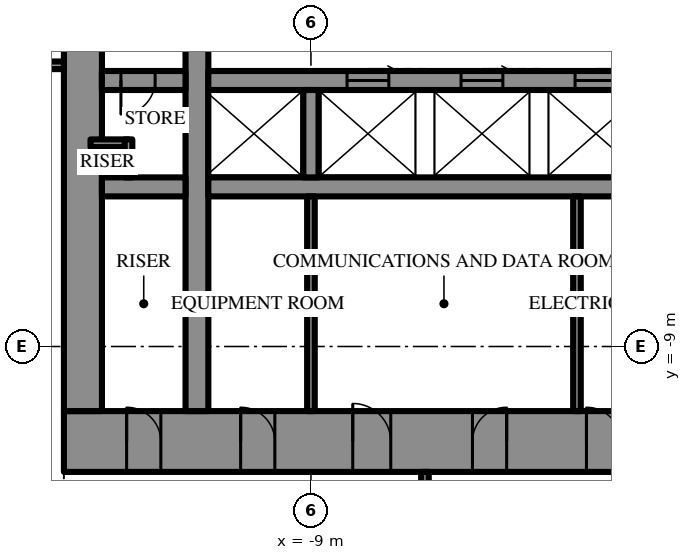
"""IFC4 building model, lengths in metres.
Left out: names, types, materials, properties, quantities, classifications, styles, units other than length and angle.
Written with IfcOpenShell. Run it as: python <this file> out.ifc"""

import sys

from ifc_helpers import new_model, si_unit, direction, frame, frame_2d, origin, place, context, subcontext, project, spatial, rectangle, extrude, element, fill, save


model = new_model("IFC4")
c1 = context("Model", 3, precision=1e-05, world=origin(), true_north=direction((0.0, 1.0)))
c2 = subcontext(c1, "Body", "Model", "MODEL_VIEW")
j1 = project(units=[si_unit("LENGTHUNIT", "METRE"), si_unit("PLANEANGLEUNIT", "RADIAN")], contexts=[c1])
p1 = place(None, origin())
s1 = spatial("IfcSite", under=j1, at=p1, CompositionType="ELEMENT")
p2 = place(p1, origin())
s2 = spatial("IfcBuilding", under=s1, at=p2, CompositionType="ELEMENT")
p3 = place(p2, frame((0.0, 0.0, 295.3)))
s3 = spatial("IfcBuildingStorey", under=s2, at=p3, CompositionType="ELEMENT", Elevation=295.3)
p4 = place(p3, frame((15.5, -11.5, 0.0), z_axis=(0.0, 0.0, 1.0), x_axis=(-1.0, 0.0, 0.0)))
e1 = element("IfcWall", 1, at=p4, inside=s3, PredefinedType="SHEAR", context=c2, shape_type="SweptSolid", body=[
    extrude(rectangle(XDim=31.0, YDim=1.6, at=frame_2d((15.5, 0.0))), origin(), (0.0, 0.0, 1.0), 4.2),
])
p5 = place(p4, frame((16.35, 0.0, 0.0)))
e2 = element("IfcOpeningElement", 2, at=p5, cuts=e1, PredefinedType="OPENING", context=c2, shape_type="SweptSolid", body=[
    extrude(rectangle(XDim=0.9, YDim=2.2, at=frame_2d((0.45, 1.1))), frame((0.0, 0.81, 0.0), z_axis=(0.0, -1.0, 0.0), x_axis=(1.0, 0.0, 0.0)), (0.0, 0.0, 1.0), 1.62),
])
p6 = place(p4, frame((19.35, 0.0, 0.0)))
e3 = element("IfcOpeningElement", 3, at=p6, cuts=e1, PredefinedType="OPENING", context=c2, shape_type="SweptSolid", body=[
    extrude(rectangle(XDim=0.9, YDim=2.2, at=frame_2d((0.45, 1.1))), frame((0.0, 0.81, 0.0), z_axis=(0.0, -1.0, 0.0), x_axis=(1.0, 0.0, 0.0)), (0.0, 0.0, 1.0), 1.62),
])
p7 = place(p4, frame((22.4, 0.0, 0.0)))
e4 = element("IfcOpeningElement", 4, at=p7, cuts=e1, PredefinedType="OPENING", context=c2, shape_type="SweptSolid", body=[
    extrude(rectangle(XDim=1.0, YDim=2.2, at=frame_2d((0.5, 1.1))), frame((0.0, 0.81, 0.0), z_axis=(0.0, -1.0, 0.0), x_axis=(1.0, 0.0, 0.0)), (0.0, 0.0, 1.0), 1.62),
])
p8 = place(p4, frame((1.65, 0.0, 0.0)))
e5 = element("IfcOpeningElement", 5, at=p8, cuts=e1, PredefinedType="OPENING", context=c2, shape_type="SweptSolid", body=[
    extrude(rectangle(XDim=0.9, YDim=2.2, at=frame_2d((0.45, 1.1))), frame((0.0, 0.81, 0.0), z_axis=(0.0, -1.0, 0.0), x_axis=(1.0, 0.0, 0.0)), (0.0, 0.0, 1.0), 1.62),
])
p9 = place(p4, frame((4.65, 0.0, 0.0)))
e6 = element("IfcOpeningElement", 6, at=p9, cuts=e1, PredefinedType="OPENING", context=c2, shape_type="SweptSolid", body=[
    extrude(rectangle(XDim=0.9, YDim=2.2, at=frame_2d((0.45, 1.1))), frame((0.0, 0.81, 0.0), z_axis=(0.0, -1.0, 0.0), x_axis=(1.0, 0.0, 0.0)), (0.0, 0.0, 1.0), 1.62),
])
p10 = place(p4, frame((25.45, 0.0, 0.0)))
e7 = element("IfcOpeningElement", 7, at=p10, cuts=e1, PredefinedType="OPENING", context=c2, shape_type="SweptSolid", body=[
    extrude(rectangle(XDim=0.9, YDim=2.2, at=frame_2d((0.45, 1.1))), frame((0.0, 0.81, 0.0), z_axis=(0.0, -1.0, 0.0), x_axis=(1.0, 0.0, 0.0)), (0.0, 0.0, 1.0), 1.62),
])
p11 = place(p4, frame((28.45, 0.0, 0.0)))
e8 = element("IfcOpeningElement", 8, at=p11, cuts=e1, PredefinedType="OPENING", context=c2, shape_type="SweptSolid", body=[
    extrude(rectangle(XDim=0.9, YDim=2.2, at=frame_2d((0.45, 1.1))), frame((0.0, 0.81, 0.0), z_axis=(0.0, -1.0, 0.0), x_axis=(1.0, 0.0, 0.0)), (0.0, 0.0, 1.0), 1.62),
])
p12 = place(p3, frame((-15.0, 10.7, 0.0), z_axis=(0.0, 0.0, 1.0), x_axis=(0.0, -1.0, 0.0)))
e9 = element("IfcWall", 9, at=p12, inside=s3, PredefinedType="SHEAR", context=c2, shape_type="SweptSolid", body=[
    extrude(rectangle(XDim=21.4, YDim=1.0, at=frame_2d((10.7, 0.0))), origin(), (0.0, 0.0, 1.0), 4.2),
])
p13 = place(p12, frame((9.8, 0.0, 0.0)))
e10 = element("IfcOpeningElement", 10, at=p13, cuts=e9, PredefinedType="OPENING", context=c2, shape_type="SweptSolid", body=[
    extrude(rectangle(XDim=1.8, YDim=2.4, at=frame_2d((0.9, 1.2))), frame((0.0, 0.51, 0.0), z_axis=(0.0, -1.0, 0.0), x_axis=(1.0, 0.0, 0.0)), (0.0, 0.0, 1.0), 1.02),
])
p14 = place(p3, frame((-12.0, -10.7, 0.0), z_axis=(0.0, 0.0, 1.0), x_axis=(0.0, 1.0, 0.0)))
e11 = element("IfcWall", 11, at=p14, inside=s3, PredefinedType="SHEAR", context=c2, shape_type="SweptSolid", body=[
    extrude(rectangle(XDim=21.4, YDim=0.6, at=frame_2d((10.7, 0.0))), origin(), (0.0, 0.0, 1.0), 4.2),
])
p15 = place(p14, frame((9.8, 0.0, 0.0)))
e12 = element("IfcOpeningElement", 12, at=p15, cuts=e11, PredefinedType="OPENING", context=c2, shape_type="SweptSolid", body=[
    extrude(rectangle(XDim=1.8, YDim=2.4, at=frame_2d((0.9, 1.2))), frame((0.0, 0.31, 0.0), z_axis=(0.0, -1.0, 0.0), x_axis=(1.0, 0.0, 0.0)), (0.0, 0.0, 1.0), 0.62),
])
p16 = place(p3, frame((3.2, -2.0, 0.0), z_axis=(0.0, 0.0, 1.0), x_axis=(-1.0, 0.0, 0.0)))
e13 = element("IfcWall", 13, at=p16, inside=s3, PredefinedType="SHEAR", context=c2, shape_type="SweptSolid", body=[
    extrude(rectangle(XDim=14.9, YDim=0.5, at=frame_2d((7.45, 0.0))), origin(), (0.0, 0.0, 1.0), 4.2),
])
p17 = place(p16, frame((1.15, 0.0, 0.0)))
e14 = element("IfcOpeningElement", 14, at=p17, cuts=e13, PredefinedType="OPENING", context=c2, shape_type="SweptSolid", body=[
    extrude(rectangle(XDim=1.1, YDim=2.2, at=frame_2d((0.55, 1.1))), frame((0.0, 0.26, 0.0), z_axis=(0.0, -1.0, 0.0), x_axis=(1.0, 0.0, 0.0)), (0.0, 0.0, 1.0), 0.52),
])
p18 = place(p16, frame((4.15, 0.0, 0.0)))
e15 = element("IfcOpeningElement", 15, at=p18, cuts=e13, PredefinedType="OPENING", context=c2, shape_type="SweptSolid", body=[
    extrude(rectangle(XDim=1.1, YDim=2.2, at=frame_2d((0.55, 1.1))), frame((0.0, 0.26, 0.0), z_axis=(0.0, -1.0, 0.0), x_axis=(1.0, 0.0, 0.0)), (0.0, 0.0, 1.0), 0.52),
])
p19 = place(p16, frame((7.15, 0.0, 0.0)))
e16 = element("IfcOpeningElement", 16, at=p19, cuts=e13, PredefinedType="OPENING", context=c2, shape_type="SweptSolid", body=[
    extrude(rectangle(XDim=1.1, YDim=2.2, at=frame_2d((0.55, 1.1))), frame((0.0, 0.26, 0.0), z_axis=(0.0, -1.0, 0.0), x_axis=(1.0, 0.0, 0.0)), (0.0, 0.0, 1.0), 0.52),
])
p20 = place(p16, frame((10.15, 0.0, 0.0)))
e17 = element("IfcOpeningElement", 17, at=p20, cuts=e13, PredefinedType="OPENING", context=c2, shape_type="SweptSolid", body=[
    extrude(rectangle(XDim=1.1, YDim=2.2, at=frame_2d((0.55, 1.1))), frame((0.0, 0.26, 0.0), z_axis=(0.0, -1.0, 0.0), x_axis=(1.0, 0.0, 0.0)), (0.0, 0.0, 1.0), 0.52),
])
p21 = place(p3, frame((-12.3, -2.0, 0.0), z_axis=(0.0, 0.0, 1.0), x_axis=(-1.0, 0.0, 0.0)))
e18 = element("IfcWall", 18, at=p21, inside=s3, PredefinedType="SHEAR", context=c2, shape_type="SweptSolid", body=[
    extrude(rectangle(XDim=2.2, YDim=0.5, at=frame_2d((1.1, 0.0))), origin(), (0.0, 0.0, 1.0), 4.2),
])
p22 = place(p21, frame((0.8, 0.0, 0.0)))
e19 = element("IfcOpeningElement", 19, at=p22, cuts=e18, PredefinedType="OPENING", context=c2, shape_type="SweptSolid", body=[
    extrude(rectangle(XDim=0.9, YDim=2.2, at=frame_2d((0.45, 1.1))), frame((0.0, 0.26, 0.0), z_axis=(0.0, -1.0, 0.0), x_axis=(1.0, 0.0, 0.0)), (0.0, 0.0, 1.0), 0.52),
])
p23 = place(p3, frame((11.7, -4.8, 0.0), z_axis=(0.0, 0.0, 1.0), x_axis=(-1.0, 0.0, 0.0)))
e20 = element("IfcWall", 20, at=p23, inside=s3, PredefinedType="SHEAR", context=c2, shape_type="SweptSolid", body=[
    extrude(rectangle(XDim=23.4, YDim=0.5, at=frame_2d((11.7, 0.0))), origin(), (0.0, 0.0, 1.0), 4.2),
])
p24 = place(p23, frame((6.6, 0.0, 0.0)))
e21 = element("IfcOpeningElement", 21, at=p24, cuts=e20, PredefinedType="OPENING", context=c2, shape_type="SweptSolid", body=[
    extrude(rectangle(XDim=1.2, YDim=2.2, at=frame_2d((0.6, 1.1))), frame((0.0, 0.26, 0.0), z_axis=(0.0, -1.0, 0.0), x_axis=(1.0, 0.0, 0.0)), (0.0, 0.0, 1.0), 0.52),
])
p25 = place(p23, frame((3.6, 0.0, 0.0)))
e22 = element("IfcOpeningElement", 22, at=p25, cuts=e20, PredefinedType="OPENING", context=c2, shape_type="SweptSolid", body=[
    extrude(rectangle(XDim=1.2, YDim=2.2, at=frame_2d((0.6, 1.1))), frame((0.0, 0.26, 0.0), z_axis=(0.0, -1.0, 0.0), x_axis=(1.0, 0.0, 0.0)), (0.0, 0.0, 1.0), 0.52),
])
p26 = place(p3, frame((-12.3, -4.8, 0.0), z_axis=(0.0, 0.0, 1.0), x_axis=(-1.0, 0.0, 0.0)))
e23 = element("IfcWall", 23, at=p26, inside=s3, PredefinedType="SHEAR", context=c2, shape_type="SweptSolid", body=[
    extrude(rectangle(XDim=2.2, YDim=0.5, at=frame_2d((1.1, 0.0))), origin(), (0.0, 0.0, 1.0), 4.2),
])
p27 = place(p3, frame((-9.0, -2.25, 0.0), z_axis=(0.0, 0.0, 1.0), x_axis=(0.0, -1.0, 0.0)))
e24 = element("IfcWall", 24, at=p27, inside=s3, PredefinedType="SHEAR", context=c2, shape_type="SweptSolid", body=[
    extrude(rectangle(XDim=2.3, YDim=0.4, at=frame_2d((1.15, 0.0))), origin(), (0.0, 0.0, 1.0), 4.2),
])
for number, where, z_axis, x_axis in (
    (25, (-9.0, -5.05, 0.0), (0.0, 0.0, 1.0), (0.0, -1.0, 0.0)),
    (26, (-2.0, -5.05, 0.0), (0.0, 0.0, 1.0), (0.0, -1.0, 0.0)),
):
    element("IfcWall", number, at=place(p3, frame(where, z_axis=z_axis, x_axis=x_axis)), inside=s3, PredefinedType="PARTITIONING", context=c2, shape_type="SweptSolid", body=[
        extrude(rectangle(XDim=5.65, YDim=0.2, at=frame_2d((2.825, 0.0))), origin(), (0.0, 0.0, 1.0), 3.9),
    ])
for number, where, z_axis, x_axis in (
    (27, (-13.8, -3.65, 0.0), (0.0, 0.0, 1.0), (-1.0, 0.0, 0.0)),
    (28, (-13.8, -3.55, 0.0), (0.0, 0.0, 1.0), (0.0, -1.0, 0.0)),
):
    element("IfcWall", number, at=place(p3, frame(where, z_axis=z_axis, x_axis=x_axis)), inside=s3, PredefinedType="PARTITIONING", context=c2, shape_type="SweptSolid", body=[
        extrude(rectangle(XDim=1.0, YDim=0.2, at=frame_2d((0.5, 0.0))), origin(), (0.0, 0.0, 1.0), 3.9),
    ])
p28 = place(p3, frame((-15.5, -1.6, 0.0), z_axis=(0.0, 0.0, 1.0), x_axis=(-1.0, 0.0, 0.0)))
e29 = element("IfcWall", 29, at=p28, inside=s3, PredefinedType="PARTITIONING", context=c2, shape_type="SweptSolid", body=[
    extrude(rectangle(XDim=10.7, YDim=0.2, at=frame_2d((5.35, 0.0))), origin(), (0.0, 0.0, 1.0), 3.9),
])
p29 = place(p28, frame((2.71, 0.0, 0.0)))
e30 = element("IfcOpeningElement", 30, at=p29, cuts=e29, PredefinedType="OPENING", context=c2, shape_type="SweptSolid", body=[
    extrude(rectangle(XDim=1.0, YDim=2.2, at=frame_2d((0.5, 1.1))), frame((0.0, 0.11, 0.0), z_axis=(0.0, -1.0, 0.0), x_axis=(1.0, 0.0, 0.0)), (0.0, 0.0, 1.0), 0.22),
])
p30 = place(p3, frame((-6.0, -12.3, 0.0), z_axis=(0.0, 0.0, 1.0), x_axis=(0.0, -1.0, 0.0)))
e31 = element("IfcWall", 31, at=p30, inside=s3, PredefinedType="PARTITIONING", context=c2, shape_type="SweptSolid", body=[
    extrude(rectangle(XDim=16.5, YDim=0.2, at=frame_2d((8.25, 0.0))), origin(), (0.0, 0.0, 1.0), 3.9),
])
p31 = place(p5, frame((0.9, 0.0, 0.0), z_axis=(0.0, 0.0, 1.0), x_axis=(-1.0, 0.0, 0.0)))
e32 = element("IfcDoor", 32, at=p31, inside=s3, OperationType="SINGLE_SWING_RIGHT", PredefinedType="DOOR", context=c2, shape_type="SweptSolid", body=[
    extrude(rectangle(XDim=0.9, YDim=2.2, at=frame_2d((0.45, 1.1))), frame((0.0, 0.025, 0.0), z_axis=(0.0, -1.0, 0.0), x_axis=(1.0, 0.0, 0.0)), (0.0, 0.0, 1.0), 0.05),
])
fill(e2, e32)
p32 = place(p6, frame((0.9, 0.0, 0.0), z_axis=(0.0, 0.0, 1.0), x_axis=(-1.0, 0.0, 0.0)))
e33 = element("IfcDoor", 33, at=p32, inside=s3, OperationType="SINGLE_SWING_LEFT", PredefinedType="DOOR", context=c2, shape_type="SweptSolid", body=[
    extrude(rectangle(XDim=0.9, YDim=2.2, at=frame_2d((0.45, 1.1))), frame((0.0, 0.025, 0.0), z_axis=(0.0, -1.0, 0.0), x_axis=(1.0, 0.0, 0.0)), (0.0, 0.0, 1.0), 0.05),
])
fill(e3, e33)
p33 = place(p7, frame((1.0, 0.0, 0.0), z_axis=(0.0, 0.0, 1.0), x_axis=(-1.0, 0.0, 0.0)))
e34 = element("IfcDoor", 34, at=p33, inside=s3, OperationType="SINGLE_SWING_RIGHT", PredefinedType="DOOR", context=c2, shape_type="SweptSolid", body=[
    extrude(rectangle(XDim=1.0, YDim=2.2, at=frame_2d((0.5, 1.1))), frame((0.0, 0.025, 0.0), z_axis=(0.0, -1.0, 0.0), x_axis=(1.0, 0.0, 0.0)), (0.0, 0.0, 1.0), 0.05),
])
fill(e4, e34)
p34 = place(p10, frame((0.9, 0.0, 0.0), z_axis=(0.0, 0.0, 1.0), x_axis=(-1.0, 0.0, 0.0)))
e35 = element("IfcDoor", 35, at=p34, inside=s3, OperationType="SINGLE_SWING_RIGHT", PredefinedType="DOOR", context=c2, shape_type="SweptSolid", body=[
    extrude(rectangle(XDim=0.9, YDim=2.2, at=frame_2d((0.45, 1.1))), frame((0.0, 0.025, 0.0), z_axis=(0.0, -1.0, 0.0), x_axis=(1.0, 0.0, 0.0)), (0.0, 0.0, 1.0), 0.05),
])
fill(e7, e35)
p35 = place(p11, frame((0.9, 0.0, 0.0), z_axis=(0.0, 0.0, 1.0), x_axis=(-1.0, 0.0, 0.0)))
e36 = element("IfcDoor", 36, at=p35, inside=s3, OperationType="SINGLE_SWING_RIGHT", PredefinedType="DOOR", context=c2, shape_type="SweptSolid", body=[
    extrude(rectangle(XDim=0.9, YDim=2.2, at=frame_2d((0.45, 1.1))), frame((0.0, 0.025, 0.0), z_axis=(0.0, -1.0, 0.0), x_axis=(1.0, 0.0, 0.0)), (0.0, 0.0, 1.0), 0.05),
])
fill(e8, e36)
p36 = place(p22, origin())
e37 = element("IfcDoor", 37, at=p36, inside=s3, OperationType="SINGLE_SWING_LEFT", PredefinedType="DOOR", context=c2, shape_type="SweptSolid", body=[
    extrude(rectangle(XDim=0.9, YDim=2.2, at=frame_2d((0.45, 1.1))), frame((0.0, 0.025, 0.0), z_axis=(0.0, -1.0, 0.0), x_axis=(1.0, 0.0, 0.0)), (0.0, 0.0, 1.0), 0.05),
])
fill(e19, e37)
p37 = place(p18, frame((1.1, 0.0, 0.0), z_axis=(0.0, 0.0, 1.0), x_axis=(-1.0, 0.0, 0.0)))
e38 = element("IfcDoor", 38, at=p37, inside=s3, OperationType="SLIDING_TO_LEFT", PredefinedType="DOOR", context=c2, shape_type="SweptSolid", body=[
    extrude(rectangle(XDim=1.1, YDim=2.2, at=frame_2d((0.55, 1.1))), frame((0.0, 0.025, 0.0), z_axis=(0.0, -1.0, 0.0), x_axis=(1.0, 0.0, 0.0)), (0.0, 0.0, 1.0), 0.05),
])
fill(e15, e38)
p38 = place(p19, frame((1.1, 0.0, 0.0), z_axis=(0.0, 0.0, 1.0), x_axis=(-1.0, 0.0, 0.0)))
e39 = element("IfcDoor", 39, at=p38, inside=s3, OperationType="SLIDING_TO_LEFT", PredefinedType="DOOR", context=c2, shape_type="SweptSolid", body=[
    extrude(rectangle(XDim=1.1, YDim=2.2, at=frame_2d((0.55, 1.1))), frame((0.0, 0.025, 0.0), z_axis=(0.0, -1.0, 0.0), x_axis=(1.0, 0.0, 0.0)), (0.0, 0.0, 1.0), 0.05),
])
fill(e16, e39)
p39 = place(p20, frame((1.1, 0.0, 0.0), z_axis=(0.0, 0.0, 1.0), x_axis=(-1.0, 0.0, 0.0)))
e40 = element("IfcDoor", 40, at=p39, inside=s3, OperationType="SLIDING_TO_LEFT", PredefinedType="DOOR", context=c2, shape_type="SweptSolid", body=[
    extrude(rectangle(XDim=1.1, YDim=2.2, at=frame_2d((0.55, 1.1))), frame((0.0, 0.025, 0.0), z_axis=(0.0, -1.0, 0.0), x_axis=(1.0, 0.0, 0.0)), (0.0, 0.0, 1.0), 0.05),
])
fill(e17, e40)
save(model, sys.argv[1])
